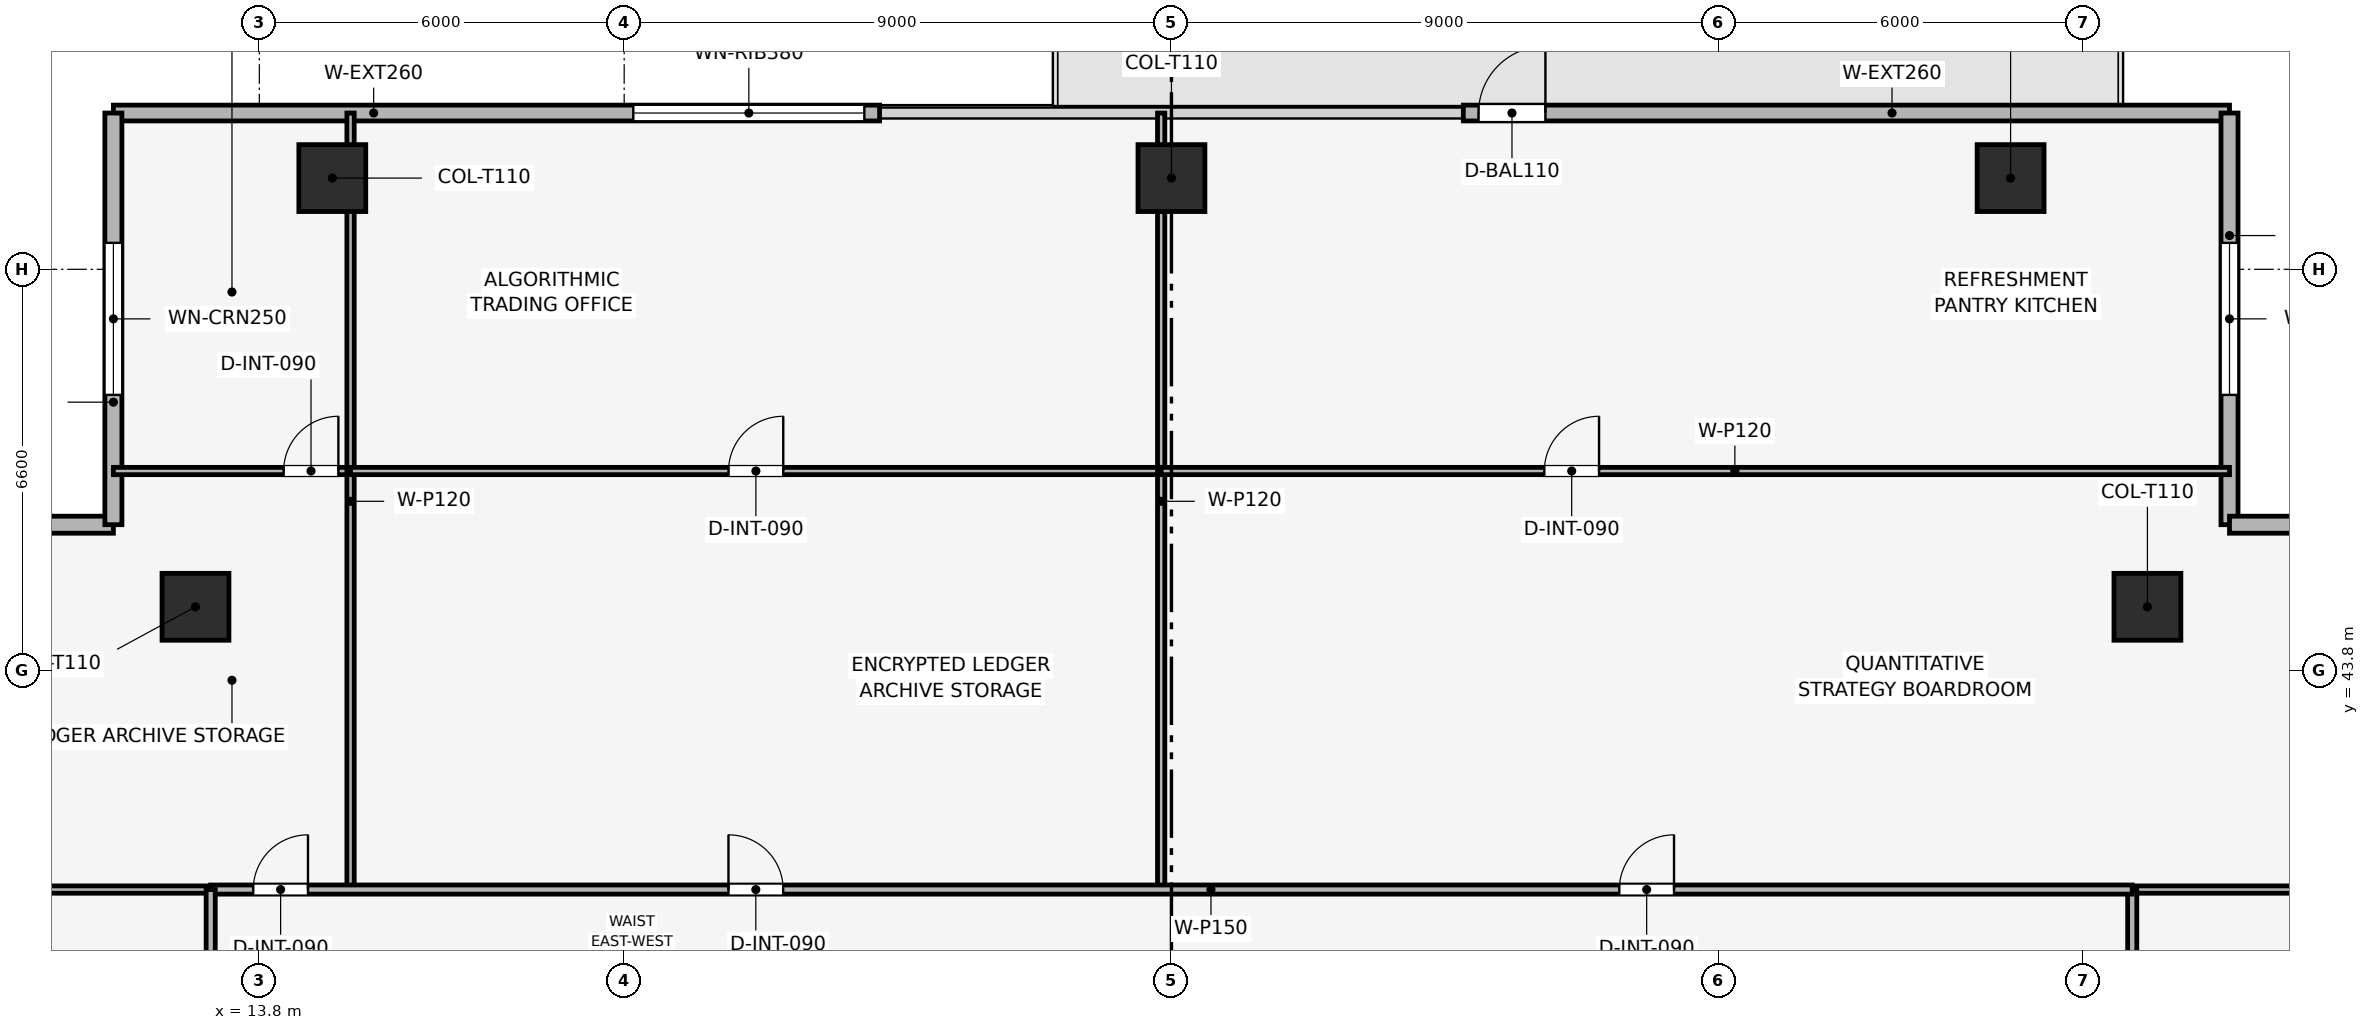
"""IFC4 building model, lengths in metres.
Left out: names, types, materials, properties, quantities, classifications, styles, units other than length and angle.
Written with IfcOpenShell. Run it as: python <this file> out.ifc"""

import sys

from ifc_helpers import new_model, si_unit, direction, frame, frame_2d, origin, origin_2d, place, context, subcontext, project, spatial, rectangle, extrude, element, fill, save


model = new_model("IFC4")
c1 = context("Model", 3, precision=1e-05, world=origin(), true_north=direction((0.0, 1.0)))
c2 = subcontext(c1, "Body", "Model", "MODEL_VIEW")
j1 = project(units=[si_unit("LENGTHUNIT", "METRE"), si_unit("PLANEANGLEUNIT", "RADIAN")], contexts=[c1])
p1 = place(None, origin())
s1 = spatial("IfcSite", under=j1, at=p1, CompositionType="ELEMENT")
p2 = place(p1, origin())
s2 = spatial("IfcBuilding", under=s1, at=p2, CompositionType="ELEMENT")
p3 = place(p2, frame((0.0, 0.0, 172.05)))
s3 = spatial("IfcBuildingStorey", under=s2, at=p3, CompositionType="ELEMENT", Elevation=172.05)
for number, where, z_axis, x_axis in (
    (1, (42.6, 51.9, 0.003), (0.0, 0.0, 1.0), (1.0, 0.0, 0.0)),
    (2, (28.8, 51.9, 0.003), (0.0, 0.0, 1.0), (1.0, 0.0, 0.0)),
    (3, (15.0, 51.9, 0.003), (0.0, 0.0, 1.0), (1.0, 0.0, 0.0)),
    (4, (44.85, 44.85, 0.003), (0.0, 0.0, 1.0), (1.0, 0.0, 0.0)),
    (5, (12.75, 44.85, 0.003), (0.0, 0.0, 1.0), (1.0, 0.0, 0.0)),
):
    element("IfcColumn", number, at=place(p3, frame(where, z_axis=z_axis, x_axis=x_axis)), inside=s3, PredefinedType="COLUMN", context=c2, shape_type="SweptSolid", body=[
        extrude(rectangle(XDim=1.1, YDim=1.1, at=origin_2d()), origin(), (0.0, 0.0, 1.0), 3.489),
    ])
p4 = place(p3, frame((11.4, 52.97, 0.0), z_axis=(0.0, 0.0, 1.0), x_axis=(1.0, 0.0, 0.0)))
e6 = element("IfcWall", 6, at=p4, inside=s3, PredefinedType="SOLIDWALL", context=c2, shape_type="SweptSolid", body=[
    extrude(rectangle(XDim=12.6, YDim=0.26, at=frame_2d((6.3, 0.0))), origin(), (0.0, 0.0, 1.0), 3.495),
])
p5 = place(p4, frame((8.55, 0.0, 0.9)))
e7 = element("IfcOpeningElement", 7, at=p5, cuts=e6, PredefinedType="OPENING", context=c2, shape_type="SweptSolid", body=[
    extrude(rectangle(XDim=3.8, YDim=1.9, at=frame_2d((1.9, 0.95))), frame((0.0, 0.14, 0.0), z_axis=(0.0, -1.0, 0.0), x_axis=(1.0, 0.0, 0.0)), (0.0, 0.0, 1.0), 0.28),
])
p6 = place(p3, frame((33.6, 52.97, 0.0), z_axis=(0.0, 0.0, 1.0), x_axis=(1.0, 0.0, 0.0)))
e8 = element("IfcWall", 8, at=p6, inside=s3, PredefinedType="SOLIDWALL", context=c2, shape_type="SweptSolid", body=[
    extrude(rectangle(XDim=12.6, YDim=0.26, at=frame_2d((6.3, 0.0))), origin(), (0.0, 0.0, 1.0), 3.495),
])
p7 = place(p6, frame((0.25, 0.0, 0.0)))
e9 = element("IfcOpeningElement", 9, at=p7, cuts=e8, PredefinedType="OPENING", context=c2, shape_type="SweptSolid", body=[
    extrude(rectangle(XDim=1.1, YDim=2.2, at=frame_2d((0.55, 1.1))), frame((0.0, 0.14, 0.0), z_axis=(0.0, -1.0, 0.0), x_axis=(1.0, 0.0, 0.0)), (0.0, 0.0, 1.0), 0.28),
])
p8 = place(p3, frame((4.63, 46.2, 0.0), z_axis=(0.0, 0.0, 1.0), x_axis=(1.0, 0.0, 0.0)))
e10 = element("IfcWall", 10, at=p8, inside=s3, PredefinedType="SOLIDWALL", context=c2, shape_type="SweptSolid", body=[
    extrude(rectangle(XDim=6.77, YDim=0.28, at=frame_2d((3.385, 0.0))), origin(), (0.0, 0.0, 1.0), 3.495),
])
p9 = place(p8, frame((2.135, 0.0, 0.9)))
e11 = element("IfcOpeningElement", 11, at=p9, cuts=e10, PredefinedType="OPENING", context=c2, shape_type="SweptSolid", body=[
    extrude(rectangle(XDim=2.5, YDim=1.9, at=frame_2d((1.25, 0.95))), frame((0.0, 0.15, 0.0), z_axis=(0.0, -1.0, 0.0), x_axis=(1.0, 0.0, 0.0)), (0.0, 0.0, 1.0), 0.3),
])
p10 = place(p3, frame((11.4, 46.2, 0.0), z_axis=(0.0, 0.0, 1.0), x_axis=(0.0, 1.0, 0.0)))
e12 = element("IfcWall", 12, at=p10, inside=s3, PredefinedType="SOLIDWALL", context=c2, shape_type="SweptSolid", body=[
    extrude(rectangle(XDim=6.77, YDim=0.28, at=frame_2d((3.385, 0.0))), origin(), (0.0, 0.0, 1.0), 3.495),
])
p11 = place(p10, frame((2.135, 0.0, 0.9)))
e13 = element("IfcOpeningElement", 13, at=p11, cuts=e12, PredefinedType="OPENING", context=c2, shape_type="SweptSolid", body=[
    extrude(rectangle(XDim=2.5, YDim=1.9, at=frame_2d((1.25, 0.95))), frame((0.0, 0.15, 0.0), z_axis=(0.0, -1.0, 0.0), x_axis=(1.0, 0.0, 0.0)), (0.0, 0.0, 1.0), 0.3),
])
p12 = place(p3, frame((46.2, 52.97, 0.0), z_axis=(0.0, 0.0, 1.0), x_axis=(0.0, -1.0, 0.0)))
e14 = element("IfcWall", 14, at=p12, inside=s3, PredefinedType="SOLIDWALL", context=c2, shape_type="SweptSolid", body=[
    extrude(rectangle(XDim=6.77, YDim=0.28, at=frame_2d((3.385, 0.0))), origin(), (0.0, 0.0, 1.0), 3.495),
])
p13 = place(p12, frame((2.135, 0.0, 0.9)))
e15 = element("IfcOpeningElement", 15, at=p13, cuts=e14, PredefinedType="OPENING", context=c2, shape_type="SweptSolid", body=[
    extrude(rectangle(XDim=2.5, YDim=1.9, at=frame_2d((1.25, 0.95))), frame((0.0, 0.15, 0.0), z_axis=(0.0, -1.0, 0.0), x_axis=(1.0, 0.0, 0.0)), (0.0, 0.0, 1.0), 0.3),
])
p14 = place(p3, frame((46.2, 46.2, 0.0), z_axis=(0.0, 0.0, 1.0), x_axis=(1.0, 0.0, 0.0)))
e16 = element("IfcWall", 16, at=p14, inside=s3, PredefinedType="SOLIDWALL", context=c2, shape_type="SweptSolid", body=[
    extrude(rectangle(XDim=6.77, YDim=0.28, at=frame_2d((3.385, 0.0))), origin(), (0.0, 0.0, 1.0), 3.495),
])
p15 = place(p14, frame((2.135, 0.0, 0.9)))
e17 = element("IfcOpeningElement", 17, at=p15, cuts=e16, PredefinedType="OPENING", context=c2, shape_type="SweptSolid", body=[
    extrude(rectangle(XDim=2.5, YDim=1.9, at=frame_2d((1.25, 0.95))), frame((0.0, 0.15, 0.0), z_axis=(0.0, -1.0, 0.0), x_axis=(1.0, 0.0, 0.0)), (0.0, 0.0, 1.0), 0.3),
])
p16 = place(p3, frame((11.4, 47.083, 0.0), z_axis=(0.0, 0.0, 1.0), x_axis=(1.0, 0.0, 0.0)))
e18 = element("IfcWall", 18, at=p16, inside=s3, PredefinedType="PARTITIONING", context=c2, shape_type="SweptSolid", body=[
    extrude(rectangle(XDim=3.9, YDim=0.12, at=frame_2d((1.95, 0.0))), origin(), (0.0, 0.0, 1.0), 2.98),
])
p17 = place(p16, frame((2.8, 0.0, 0.0)))
e19 = element("IfcOpeningElement", 19, at=p17, cuts=e18, PredefinedType="OPENING", context=c2, shape_type="SweptSolid", body=[
    extrude(rectangle(XDim=0.9, YDim=2.1, at=frame_2d((0.45, 1.05))), frame((0.0, 0.07, 0.0), z_axis=(0.0, -1.0, 0.0), x_axis=(1.0, 0.0, 0.0)), (0.0, 0.0, 1.0), 0.14),
])
p18 = place(p3, frame((15.3, 40.2, 0.0), z_axis=(0.0, 0.0, 1.0), x_axis=(0.0, 1.0, 0.0)))
e20 = element("IfcWall", 20, at=p18, inside=s3, PredefinedType="PARTITIONING", context=c2, shape_type="SweptSolid", body=[
    extrude(rectangle(XDim=12.77, YDim=0.12, at=frame_2d((6.385, 0.0))), origin(), (0.0, 0.0, 1.0), 2.98),
])
p19 = place(p3, frame((15.3, 47.083, 0.0), z_axis=(0.0, 0.0, 1.0), x_axis=(1.0, 0.0, 0.0)))
e21 = element("IfcWall", 21, at=p19, inside=s3, PredefinedType="PARTITIONING", context=c2, shape_type="SweptSolid", body=[
    extrude(rectangle(XDim=13.331, YDim=0.12, at=frame_2d((6.666, 0.0))), origin(), (0.0, 0.0, 1.0), 3.03),
])
p20 = place(p19, frame((6.216, 0.0, 0.0)))
e22 = element("IfcOpeningElement", 22, at=p20, cuts=e21, PredefinedType="OPENING", context=c2, shape_type="SweptSolid", body=[
    extrude(rectangle(XDim=0.9, YDim=2.1, at=frame_2d((0.45, 1.05))), frame((0.0, 0.07, 0.0), z_axis=(0.0, -1.0, 0.0), x_axis=(1.0, 0.0, 0.0)), (0.0, 0.0, 1.0), 0.14),
])
p21 = place(p3, frame((28.631, 40.2, 0.0), z_axis=(0.0, 0.0, 1.0), x_axis=(0.0, 1.0, 0.0)))
e23 = element("IfcWall", 23, at=p21, inside=s3, PredefinedType="PARTITIONING", context=c2, shape_type="SweptSolid", body=[
    extrude(rectangle(XDim=12.77, YDim=0.12, at=frame_2d((6.385, 0.0))), origin(), (0.0, 0.0, 1.0), 2.98),
])
p22 = place(p3, frame((28.631, 47.083, 0.0), z_axis=(0.0, 0.0, 1.0), x_axis=(1.0, 0.0, 0.0)))
e24 = element("IfcWall", 24, at=p22, inside=s3, PredefinedType="PARTITIONING", context=c2, shape_type="SweptSolid", body=[
    extrude(rectangle(XDim=17.569, YDim=0.12, at=frame_2d((8.784, 0.0))), origin(), (0.0, 0.0, 1.0), 2.98),
])
p23 = place(p22, frame((6.301, 0.0, 0.0)))
e25 = element("IfcOpeningElement", 25, at=p23, cuts=e24, PredefinedType="OPENING", context=c2, shape_type="SweptSolid", body=[
    extrude(rectangle(XDim=0.9, YDim=2.1, at=frame_2d((0.45, 1.05))), frame((0.0, 0.07, 0.0), z_axis=(0.0, -1.0, 0.0), x_axis=(1.0, 0.0, 0.0)), (0.0, 0.0, 1.0), 0.14),
])
p24 = place(p3, frame((4.63, 40.2, 0.0), z_axis=(0.0, 0.0, 1.0), x_axis=(1.0, 0.0, 0.0)))
e26 = element("IfcWall", 26, at=p24, inside=s3, PredefinedType="PARTITIONING", context=c2, shape_type="SweptSolid", body=[
    extrude(rectangle(XDim=8.37, YDim=0.12, at=frame_2d((4.185, 0.0))), origin(), (0.0, 0.0, 1.0), 2.98),
])
p25 = place(p3, frame((44.6, 40.2, 0.0), z_axis=(0.0, 0.0, 1.0), x_axis=(1.0, 0.0, 0.0)))
e27 = element("IfcWall", 27, at=p25, inside=s3, PredefinedType="PARTITIONING", context=c2, shape_type="SweptSolid", body=[
    extrude(rectangle(XDim=8.37, YDim=0.12, at=frame_2d((4.185, 0.0))), origin(), (0.0, 0.0, 1.0), 2.98),
])
p26 = place(p3, frame((44.6, 37.8, 0.0), z_axis=(0.0, 0.0, 1.0), x_axis=(0.0, 1.0, 0.0)))
e28 = element("IfcWall", 28, at=p26, inside=s3, PredefinedType="PARTITIONING", context=c2, shape_type="SweptSolid", body=[
    extrude(rectangle(XDim=2.4, YDim=0.15, at=frame_2d((1.2, 0.0))), origin(), (0.0, 0.0, 1.0), 3.495),
])
p27 = place(p3, frame((13.0, 40.2, 0.0), z_axis=(0.0, 0.0, 1.0), x_axis=(1.0, 0.0, 0.0)))
e29 = element("IfcWall", 29, at=p27, inside=s3, PredefinedType="PARTITIONING", context=c2, shape_type="SweptSolid", body=[
    extrude(rectangle(XDim=31.6, YDim=0.15, at=frame_2d((15.8, 0.0))), origin(), (0.0, 0.0, 1.0), 3.03),
])
p28 = place(p27, frame((0.7, 0.0, 0.0)))
e30 = element("IfcOpeningElement", 30, at=p28, cuts=e29, PredefinedType="OPENING", context=c2, shape_type="SweptSolid", body=[
    extrude(rectangle(XDim=0.9, YDim=2.1, at=frame_2d((0.45, 1.05))), frame((0.0, 0.085, 0.0), z_axis=(0.0, -1.0, 0.0), x_axis=(1.0, 0.0, 0.0)), (0.0, 0.0, 1.0), 0.17),
])
p29 = place(p27, frame((8.515, 0.0, 0.0)))
e31 = element("IfcOpeningElement", 31, at=p29, cuts=e29, PredefinedType="OPENING", context=c2, shape_type="SweptSolid", body=[
    extrude(rectangle(XDim=0.9, YDim=2.1, at=frame_2d((0.45, 1.05))), frame((0.0, 0.085, 0.0), z_axis=(0.0, -1.0, 0.0), x_axis=(1.0, 0.0, 0.0)), (0.0, 0.0, 1.0), 0.17),
])
p30 = place(p27, frame((23.165, 0.0, 0.0)))
e32 = element("IfcOpeningElement", 32, at=p30, cuts=e29, PredefinedType="OPENING", context=c2, shape_type="SweptSolid", body=[
    extrude(rectangle(XDim=0.9, YDim=2.1, at=frame_2d((0.45, 1.05))), frame((0.0, 0.085, 0.0), z_axis=(0.0, -1.0, 0.0), x_axis=(1.0, 0.0, 0.0)), (0.0, 0.0, 1.0), 0.17),
])
p31 = place(p3, frame((13.0, 17.4, 0.0), z_axis=(0.0, 0.0, 1.0), x_axis=(0.0, 1.0, 0.0)))
e33 = element("IfcWall", 33, at=p31, inside=s3, PredefinedType="PARTITIONING", context=c2, shape_type="SweptSolid", body=[
    extrude(rectangle(XDim=22.8, YDim=0.15, at=frame_2d((11.4, 0.0))), origin(), (0.0, 0.0, 1.0), 3.03),
])
p32 = place(p31, frame((3.191, 0.0, 0.0)))
e34 = element("IfcOpeningElement", 34, at=p32, cuts=e33, PredefinedType="OPENING", context=c2, shape_type="SweptSolid", body=[
    extrude(rectangle(XDim=0.9, YDim=2.1, at=frame_2d((0.45, 1.05))), frame((0.0, 0.085, 0.0), z_axis=(0.0, -1.0, 0.0), x_axis=(1.0, 0.0, 0.0)), (0.0, 0.0, 1.0), 0.17),
])
p33 = place(p31, frame((6.581, 0.0, 0.0)))
e35 = element("IfcOpeningElement", 35, at=p33, cuts=e33, PredefinedType="OPENING", context=c2, shape_type="SweptSolid", body=[
    extrude(rectangle(XDim=0.9, YDim=2.1, at=frame_2d((0.45, 1.05))), frame((0.0, 0.085, 0.0), z_axis=(0.0, -1.0, 0.0), x_axis=(1.0, 0.0, 0.0)), (0.0, 0.0, 1.0), 0.17),
])
p34 = place(p31, frame((10.878, 0.0, 0.0)))
e36 = element("IfcOpeningElement", 36, at=p34, cuts=e33, PredefinedType="OPENING", context=c2, shape_type="SweptSolid", body=[
    extrude(rectangle(XDim=0.9, YDim=2.1, at=frame_2d((0.45, 1.05))), frame((0.0, 0.085, 0.0), z_axis=(0.0, -1.0, 0.0), x_axis=(1.0, 0.0, 0.0)), (0.0, 0.0, 1.0), 0.17),
])
p35 = place(p31, frame((16.488, 0.0, 0.0)))
e37 = element("IfcOpeningElement", 37, at=p35, cuts=e33, PredefinedType="OPENING", context=c2, shape_type="SweptSolid", body=[
    extrude(rectangle(XDim=0.9, YDim=2.1, at=frame_2d((0.45, 1.05))), frame((0.0, 0.085, 0.0), z_axis=(0.0, -1.0, 0.0), x_axis=(1.0, 0.0, 0.0)), (0.0, 0.0, 1.0), 0.17),
])
p36 = place(p7, origin())
e38 = element("IfcDoor", 38, at=p36, inside=s3, OperationType="SINGLE_SWING_RIGHT", PredefinedType="DOOR", context=c2, shape_type="SweptSolid", body=[
    extrude(rectangle(XDim=1.1, YDim=2.2, at=frame_2d((0.55, 1.1))), frame((0.0, 0.025, 0.0), z_axis=(0.0, -1.0, 0.0), x_axis=(1.0, 0.0, 0.0)), (0.0, 0.0, 1.0), 0.05),
])
fill(e9, e38)
p37 = place(p5, origin())
e39 = element("IfcWindow", 39, at=p37, inside=s3, PartitioningType="SINGLE_PANEL", PredefinedType="WINDOW", context=c2, shape_type="SweptSolid", body=[
    extrude(rectangle(XDim=3.8, YDim=1.9, at=frame_2d((1.9, 0.95))), frame((0.0, 0.03, 0.0), z_axis=(0.0, -1.0, 0.0), x_axis=(1.0, 0.0, 0.0)), (0.0, 0.0, 1.0), 0.06),
])
fill(e7, e39)
p38 = place(p11, origin())
e40 = element("IfcWindow", 40, at=p38, inside=s3, PartitioningType="SINGLE_PANEL", PredefinedType="WINDOW", context=c2, shape_type="SweptSolid", body=[
    extrude(rectangle(XDim=2.5, YDim=1.9, at=frame_2d((1.25, 0.95))), frame((0.0, 0.03, 0.0), z_axis=(0.0, -1.0, 0.0), x_axis=(1.0, 0.0, 0.0)), (0.0, 0.0, 1.0), 0.06),
])
fill(e13, e40)
p39 = place(p13, origin())
e41 = element("IfcWindow", 41, at=p39, inside=s3, PartitioningType="SINGLE_PANEL", PredefinedType="WINDOW", context=c2, shape_type="SweptSolid", body=[
    extrude(rectangle(XDim=2.5, YDim=1.9, at=frame_2d((1.25, 0.95))), frame((0.0, 0.03, 0.0), z_axis=(0.0, -1.0, 0.0), x_axis=(1.0, 0.0, 0.0)), (0.0, 0.0, 1.0), 0.06),
])
fill(e15, e41)
p40 = place(p17, origin())
e42 = element("IfcDoor", 42, at=p40, inside=s3, OperationType="SINGLE_SWING_RIGHT", PredefinedType="DOOR", context=c2, shape_type="SweptSolid", body=[
    extrude(rectangle(XDim=0.9, YDim=2.1, at=frame_2d((0.45, 1.05))), frame((0.0, 0.025, 0.0), z_axis=(0.0, -1.0, 0.0), x_axis=(1.0, 0.0, 0.0)), (0.0, 0.0, 1.0), 0.05),
])
fill(e19, e42)
p41 = place(p20, origin())
e43 = element("IfcDoor", 43, at=p41, inside=s3, OperationType="SINGLE_SWING_RIGHT", PredefinedType="DOOR", context=c2, shape_type="SweptSolid", body=[
    extrude(rectangle(XDim=0.9, YDim=2.1, at=frame_2d((0.45, 1.05))), frame((0.0, 0.025, 0.0), z_axis=(0.0, -1.0, 0.0), x_axis=(1.0, 0.0, 0.0)), (0.0, 0.0, 1.0), 0.05),
])
fill(e22, e43)
p42 = place(p23, origin())
e44 = element("IfcDoor", 44, at=p42, inside=s3, OperationType="SINGLE_SWING_RIGHT", PredefinedType="DOOR", context=c2, shape_type="SweptSolid", body=[
    extrude(rectangle(XDim=0.9, YDim=2.1, at=frame_2d((0.45, 1.05))), frame((0.0, 0.025, 0.0), z_axis=(0.0, -1.0, 0.0), x_axis=(1.0, 0.0, 0.0)), (0.0, 0.0, 1.0), 0.05),
])
fill(e25, e44)
p43 = place(p28, origin())
e45 = element("IfcDoor", 45, at=p43, inside=s3, OperationType="SINGLE_SWING_RIGHT", PredefinedType="DOOR", context=c2, shape_type="SweptSolid", body=[
    extrude(rectangle(XDim=0.9, YDim=2.1, at=frame_2d((0.45, 1.05))), frame((0.0, 0.025, 0.0), z_axis=(0.0, -1.0, 0.0), x_axis=(1.0, 0.0, 0.0)), (0.0, 0.0, 1.0), 0.05),
])
fill(e30, e45)
p44 = place(p29, origin())
e46 = element("IfcDoor", 46, at=p44, inside=s3, OperationType="SINGLE_SWING_LEFT", PredefinedType="DOOR", context=c2, shape_type="SweptSolid", body=[
    extrude(rectangle(XDim=0.9, YDim=2.1, at=frame_2d((0.45, 1.05))), frame((0.0, 0.025, 0.0), z_axis=(0.0, -1.0, 0.0), x_axis=(1.0, 0.0, 0.0)), (0.0, 0.0, 1.0), 0.05),
])
fill(e31, e46)
p45 = place(p30, origin())
e47 = element("IfcDoor", 47, at=p45, inside=s3, OperationType="SINGLE_SWING_RIGHT", PredefinedType="DOOR", context=c2, shape_type="SweptSolid", body=[
    extrude(rectangle(XDim=0.9, YDim=2.1, at=frame_2d((0.45, 1.05))), frame((0.0, 0.025, 0.0), z_axis=(0.0, -1.0, 0.0), x_axis=(1.0, 0.0, 0.0)), (0.0, 0.0, 1.0), 0.05),
])
fill(e32, e47)
save(model, sys.argv[1])
